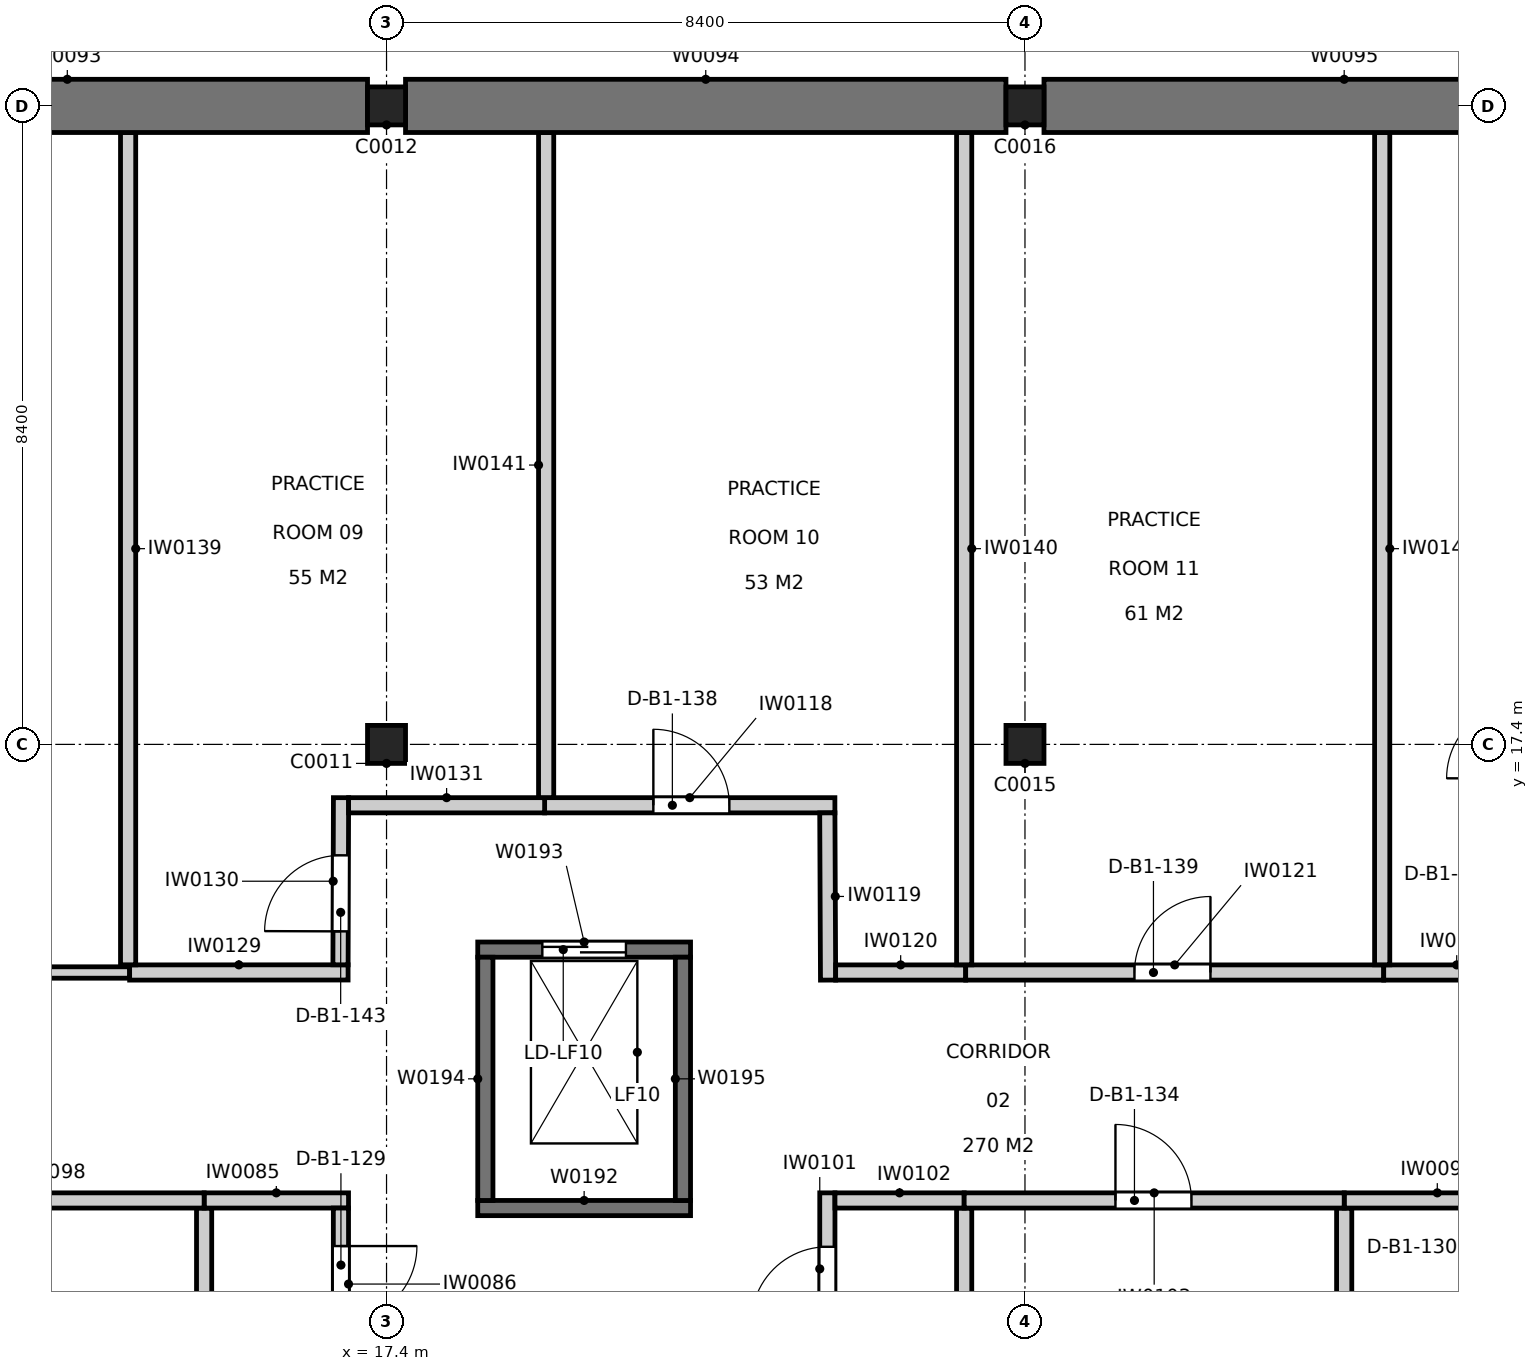
"""IFC4 building model, lengths in metres.
Left out: names, types, materials, properties, quantities, classifications, styles, units other than length and angle.
Written with IfcOpenShell. Run it as: python <this file> out.ifc"""

import sys

from ifc_helpers import new_model, si_unit, direction, frame, frame_2d, origin, origin_2d, place, context, subcontext, project, spatial, rectangle, extrude, element, fill, save


model = new_model("IFC4")
c1 = context("Model", 3, precision=1e-05, world=origin(), true_north=direction((0.0, 1.0)))
c2 = subcontext(c1, "Body", "Model", "MODEL_VIEW")
j1 = project(units=[si_unit("LENGTHUNIT", "METRE"), si_unit("PLANEANGLEUNIT", "RADIAN")], contexts=[c1])
p1 = place(None, origin())
s1 = spatial("IfcSite", under=j1, at=p1, CompositionType="ELEMENT")
p2 = place(p1, origin())
s2 = spatial("IfcBuilding", under=s1, at=p2, CompositionType="ELEMENT")
p3 = place(p2, frame((0.0, 0.0, -5.0)))
s3 = spatial("IfcBuildingStorey", under=s2, at=p3, CompositionType="ELEMENT", Elevation=-5.0)
for number, where, z_axis, x_axis in (
    (1, (17.4, 17.4, -0.5), (0.0, 0.0, 1.0), (1.0, 0.0, 0.0)),
    (2, (17.4, 25.8, -0.5), (0.0, 0.0, 1.0), (1.0, 0.0, 0.0)),
    (3, (25.8, 17.4, -0.5), (0.0, 0.0, 1.0), (1.0, 0.0, 0.0)),
    (4, (25.8, 25.8, -0.5), (0.0, 0.0, 1.0), (1.0, 0.0, 0.0)),
):
    element("IfcColumn", number, at=place(p3, frame(where, z_axis=z_axis, x_axis=x_axis)), inside=s3, PredefinedType="COLUMN", context=c2, shape_type="SweptSolid", body=[
        extrude(rectangle(XDim=0.5, YDim=0.5, at=origin_2d()), origin(), (0.0, 0.0, 1.0), 5.5),
    ])
p4 = place(p3, frame((9.25, 25.8, 0.0), z_axis=(0.0, 0.0, 1.0), x_axis=(1.0, 0.0, 0.0)))
e5 = element("IfcWall", 5, at=p4, inside=s3, PredefinedType="SOLIDWALL", context=c2, shape_type="SweptSolid", body=[
    extrude(rectangle(XDim=7.9, YDim=0.7, at=frame_2d((3.95, 0.0))), origin(), (0.0, 0.0, 1.0), 5.0),
])
p5 = place(p3, frame((17.65, 25.8, 0.0), z_axis=(0.0, 0.0, 1.0), x_axis=(1.0, 0.0, 0.0)))
e6 = element("IfcWall", 6, at=p5, inside=s3, PredefinedType="SOLIDWALL", context=c2, shape_type="SweptSolid", body=[
    extrude(rectangle(XDim=7.9, YDim=0.7, at=frame_2d((3.95, 0.0))), origin(), (0.0, 0.0, 1.0), 5.0),
])
p6 = place(p3, frame((26.05, 25.8, 0.0), z_axis=(0.0, 0.0, 1.0), x_axis=(1.0, 0.0, 0.0)))
e7 = element("IfcWall", 7, at=p6, inside=s3, PredefinedType="SOLIDWALL", context=c2, shape_type="SweptSolid", body=[
    extrude(rectangle(XDim=7.9, YDim=0.7, at=frame_2d((3.95, 0.0))), origin(), (0.0, 0.0, 1.0), 5.0),
])
p7 = place(p3, frame((18.6, 11.3, -1.4), z_axis=(0.0, 0.0, 1.0), x_axis=(1.0, 0.0, 0.0)))
e8 = element("IfcWall", 8, at=p7, inside=s3, PredefinedType="SOLIDWALL", context=c2, shape_type="SweptSolid", body=[
    extrude(rectangle(XDim=2.8, YDim=0.2, at=frame_2d((1.4, 0.0))), origin(), (0.0, 0.0, 1.0), 6.4),
])
p8 = place(p3, frame((18.6, 14.7, -1.4), z_axis=(0.0, 0.0, 1.0), x_axis=(1.0, 0.0, 0.0)))
e9 = element("IfcWall", 9, at=p8, inside=s3, PredefinedType="SOLIDWALL", context=c2, shape_type="SweptSolid", body=[
    extrude(rectangle(XDim=2.8, YDim=0.2, at=frame_2d((1.4, 0.0))), origin(), (0.0, 0.0, 1.0), 6.4),
])
p9 = place(p8, frame((0.85, 0.0, 1.4)))
e10 = element("IfcOpeningElement", 10, at=p9, cuts=e9, PredefinedType="OPENING", context=c2, shape_type="SweptSolid", body=[
    extrude(rectangle(XDim=1.1, YDim=2.1, at=frame_2d((0.55, 1.05))), frame((0.0, 0.11, 0.0), z_axis=(0.0, -1.0, 0.0), x_axis=(1.0, 0.0, 0.0)), (0.0, 0.0, 1.0), 0.22),
])
for number, where, z_axis, x_axis in (
    (11, (18.7, 11.4, -1.4), (0.0, 0.0, 1.0), (0.0, 1.0, 0.0)),
    (12, (21.3, 11.4, -1.4), (0.0, 0.0, 1.0), (0.0, 1.0, 0.0)),
):
    element("IfcWall", number, at=place(p3, frame(where, z_axis=z_axis, x_axis=x_axis)), inside=s3, PredefinedType="SOLIDWALL", context=c2, shape_type="SweptSolid", body=[
        extrude(rectangle(XDim=3.2, YDim=0.2, at=frame_2d((1.6, 0.0))), origin(), (0.0, 0.0, 1.0), 6.4),
    ])
p10 = place(p3, frame((15.0, 0.95, 0.0), z_axis=(0.0, 0.0, 1.0), x_axis=(0.0, 1.0, 0.0)))
e13 = element("IfcWall", 13, at=p10, inside=s3, PredefinedType="PARTITIONING", context=c2, shape_type="SweptSolid", body=[
    extrude(rectangle(XDim=10.35, YDim=0.2, at=frame_2d((5.175, 0.0))), origin(), (0.0, 0.0, 1.0), 4.04),
])
p11 = place(p3, frame((15.0, 11.4, 0.0), z_axis=(0.0, 0.0, 1.0), x_axis=(1.0, 0.0, 0.0)))
e14 = element("IfcWall", 14, at=p11, inside=s3, PredefinedType="PARTITIONING", context=c2, shape_type="SweptSolid", body=[
    extrude(rectangle(XDim=1.9, YDim=0.2, at=frame_2d((0.95, 0.0))), origin(), (0.0, 0.0, 1.0), 4.84),
])
p12 = place(p3, frame((16.8, 11.3, 0.0), z_axis=(0.0, 0.0, 1.0), x_axis=(0.0, -1.0, 0.0)))
e15 = element("IfcWall", 15, at=p12, inside=s3, PredefinedType="PARTITIONING", context=c2, shape_type="SweptSolid", body=[
    extrude(rectangle(XDim=2.0, YDim=0.2, at=frame_2d((1.0, 0.0))), origin(), (0.0, 0.0, 1.0), 4.84),
])
p13 = place(p12, frame((0.5, 0.0, 0.0)))
e16 = element("IfcOpeningElement", 16, at=p13, cuts=e15, PredefinedType="OPENING", context=c2, shape_type="SweptSolid", body=[
    extrude(rectangle(XDim=1.0, YDim=2.1, at=frame_2d((0.5, 1.05))), frame((0.0, 0.11, 0.0), z_axis=(0.0, -1.0, 0.0), x_axis=(1.0, 0.0, 0.0)), (0.0, 0.0, 1.0), 0.22),
])
p14 = place(p3, frame((30.0, 0.95, 0.0), z_axis=(0.0, 0.0, 1.0), x_axis=(0.0, 1.0, 0.0)))
e17 = element("IfcWall", 17, at=p14, inside=s3, PredefinedType="PARTITIONING", context=c2, shape_type="SweptSolid", body=[
    extrude(rectangle(XDim=10.35, YDim=0.2, at=frame_2d((5.175, 0.0))), origin(), (0.0, 0.0, 1.0), 4.04),
])
p15 = place(p3, frame((30.0, 11.4, 0.0), z_axis=(0.0, 0.0, 1.0), x_axis=(1.0, 0.0, 0.0)))
e18 = element("IfcWall", 18, at=p15, inside=s3, PredefinedType="PARTITIONING", context=c2, shape_type="SweptSolid", body=[
    extrude(rectangle(XDim=2.45, YDim=0.2, at=frame_2d((1.225, 0.0))), origin(), (0.0, 0.0, 1.0), 4.84),
])
p16 = place(p3, frame((10.029, 11.4, 0.0), z_axis=(0.0, 0.0, 1.0), x_axis=(1.0, 0.0, 0.0)))
e19 = element("IfcWall", 19, at=p16, inside=s3, PredefinedType="PARTITIONING", context=c2, shape_type="SweptSolid", body=[
    extrude(rectangle(XDim=4.971, YDim=0.2, at=frame_2d((2.485, 0.0))), origin(), (0.0, 0.0, 1.0), 4.84),
])
p17 = place(p16, frame((0.331, 0.0, 0.0)))
e20 = element("IfcOpeningElement", 20, at=p17, cuts=e19, PredefinedType="OPENING", context=c2, shape_type="SweptSolid", body=[
    extrude(rectangle(XDim=1.0, YDim=2.1, at=frame_2d((0.5, 1.05))), frame((0.0, 0.11, 0.0), z_axis=(0.0, -1.0, 0.0), x_axis=(1.0, 0.0, 0.0)), (0.0, 0.0, 1.0), 0.22),
])
p18 = place(p3, frame((25.0, 11.3, 0.0), z_axis=(0.0, 0.0, 1.0), x_axis=(0.0, -1.0, 0.0)))
e21 = element("IfcWall", 21, at=p18, inside=s3, PredefinedType="PARTITIONING", context=c2, shape_type="SweptSolid", body=[
    extrude(rectangle(XDim=10.35, YDim=0.2, at=frame_2d((5.175, 0.0))), origin(), (0.0, 0.0, 1.0), 4.04),
])
p19 = place(p3, frame((23.2, 9.5, 0.0), z_axis=(0.0, 0.0, 1.0), x_axis=(0.0, 1.0, 0.0)))
e22 = element("IfcWall", 22, at=p19, inside=s3, PredefinedType="PARTITIONING", context=c2, shape_type="SweptSolid", body=[
    extrude(rectangle(XDim=2.0, YDim=0.2, at=frame_2d((1.0, 0.0))), origin(), (0.0, 0.0, 1.0), 4.84),
])
p20 = place(p19, frame((0.29, 0.0, 0.0)))
e23 = element("IfcOpeningElement", 23, at=p20, cuts=e22, PredefinedType="OPENING", context=c2, shape_type="SweptSolid", body=[
    extrude(rectangle(XDim=1.0, YDim=2.1, at=frame_2d((0.5, 1.05))), frame((0.0, 0.11, 0.0), z_axis=(0.0, -1.0, 0.0), x_axis=(1.0, 0.0, 0.0)), (0.0, 0.0, 1.0), 0.22),
])
p21 = place(p3, frame((23.3, 11.4, 0.0), z_axis=(0.0, 0.0, 1.0), x_axis=(1.0, 0.0, 0.0)))
e24 = element("IfcWall", 24, at=p21, inside=s3, PredefinedType="PARTITIONING", context=c2, shape_type="SweptSolid", body=[
    extrude(rectangle(XDim=1.7, YDim=0.2, at=frame_2d((0.85, 0.0))), origin(), (0.0, 0.0, 1.0), 4.84),
])
p22 = place(p3, frame((25.0, 11.4, 0.0), z_axis=(0.0, 0.0, 1.0), x_axis=(1.0, 0.0, 0.0)))
e25 = element("IfcWall", 25, at=p22, inside=s3, PredefinedType="PARTITIONING", context=c2, shape_type="SweptSolid", body=[
    extrude(rectangle(XDim=5.0, YDim=0.2, at=frame_2d((2.5, 0.0))), origin(), (0.0, 0.0, 1.0), 4.04),
])
p23 = place(p22, frame((1.99, 0.0, 0.0)))
e26 = element("IfcOpeningElement", 26, at=p23, cuts=e25, PredefinedType="OPENING", context=c2, shape_type="SweptSolid", body=[
    extrude(rectangle(XDim=1.0, YDim=2.1, at=frame_2d((0.5, 1.05))), frame((0.0, 0.11, 0.0), z_axis=(0.0, -1.0, 0.0), x_axis=(1.0, 0.0, 0.0)), (0.0, 0.0, 1.0), 0.22),
])
p24 = place(p3, frame((9.734, 14.399, 0.0), z_axis=(0.0, 0.0, 1.0), x_axis=(1.0, 0.0, 0.0)))
e27 = element("IfcWall", 27, at=p24, inside=s3, PredefinedType="PARTITIONING", context=c2, shape_type="SweptSolid", body=[
    extrude(rectangle(XDim=4.286, YDim=0.15, at=frame_2d((2.143, 0.0))), origin(), (0.0, 0.0, 1.0), 4.24),
])
p25 = place(p3, frame((19.48, 16.599, 0.0), z_axis=(0.0, 0.0, 1.0), x_axis=(1.0, 0.0, 0.0)))
e28 = element("IfcWall", 28, at=p25, inside=s3, PredefinedType="PARTITIONING", context=c2, shape_type="SweptSolid", body=[
    extrude(rectangle(XDim=3.819, YDim=0.2, at=frame_2d((1.91, 0.0))), origin(), (0.0, 0.0, 1.0), 4.84),
])
p26 = place(p25, frame((1.431, 0.0, 0.0)))
e29 = element("IfcOpeningElement", 29, at=p26, cuts=e28, PredefinedType="OPENING", context=c2, shape_type="SweptSolid", body=[
    extrude(rectangle(XDim=1.0, YDim=2.1, at=frame_2d((0.5, 1.05))), frame((0.0, 0.11, 0.0), z_axis=(0.0, -1.0, 0.0), x_axis=(1.0, 0.0, 0.0)), (0.0, 0.0, 1.0), 0.22),
])
p27 = place(p3, frame((23.199, 16.499, 0.0), z_axis=(0.0, 0.0, 1.0), x_axis=(0.004549947354, -0.999989648936, 0.0)))
e30 = element("IfcWall", 30, at=p27, inside=s3, PredefinedType="PARTITIONING", context=c2, shape_type="SweptSolid", body=[
    extrude(rectangle(XDim=2.2, YDim=0.2, at=frame_2d((1.1, 0.0))), origin(), (0.0, 0.0, 1.0), 4.24),
])
p28 = place(p3, frame((23.309, 14.399, 0.0), z_axis=(0.0, 0.0, 1.0), x_axis=(1.0, 0.0, 0.0)))
e31 = element("IfcWall", 31, at=p28, inside=s3, PredefinedType="PARTITIONING", context=c2, shape_type="SweptSolid", body=[
    extrude(rectangle(XDim=1.711, YDim=0.2, at=frame_2d((0.855, 0.0))), origin(), (0.0, 0.0, 1.0), 4.24),
])
p29 = place(p3, frame((25.02, 14.399, 0.0), z_axis=(0.0, 0.0, 1.0), x_axis=(1.0, 0.0, 0.0)))
e32 = element("IfcWall", 32, at=p29, inside=s3, PredefinedType="PARTITIONING", context=c2, shape_type="SweptSolid", body=[
    extrude(rectangle(XDim=5.5, YDim=0.2, at=frame_2d((2.75, 0.0))), origin(), (0.0, 0.0, 1.0), 4.04),
])
p30 = place(p29, frame((2.22, 0.0, 0.0)))
e33 = element("IfcOpeningElement", 33, at=p30, cuts=e32, PredefinedType="OPENING", context=c2, shape_type="SweptSolid", body=[
    extrude(rectangle(XDim=1.0, YDim=2.1, at=frame_2d((0.5, 1.05))), frame((0.0, 0.11, 0.0), z_axis=(0.0, -1.0, 0.0), x_axis=(1.0, 0.0, 0.0)), (0.0, 0.0, 1.0), 0.22),
])
p31 = place(p3, frame((14.02, 14.399, 0.0), z_axis=(0.0, 0.0, 1.0), x_axis=(0.999999909799, 0.000424736625, 0.0)))
e34 = element("IfcWall", 34, at=p31, inside=s3, PredefinedType="PARTITIONING", context=c2, shape_type="SweptSolid", body=[
    extrude(rectangle(XDim=2.874, YDim=0.2, at=frame_2d((1.437, 0.0))), origin(), (0.0, 0.0, 1.0), 4.24),
])
p32 = place(p3, frame((16.794, 14.5, 0.0), z_axis=(0.0, 0.0, 1.0), x_axis=(0.003108678218, 0.999995168048, 0.0)))
e35 = element("IfcWall", 35, at=p32, inside=s3, PredefinedType="PARTITIONING", context=c2, shape_type="SweptSolid", body=[
    extrude(rectangle(XDim=2.199, YDim=0.2, at=frame_2d((1.1, 0.0))), origin(), (0.0, 0.0, 1.0), 4.24),
])
p33 = place(p32, frame((0.44, 0.0, 0.0)))
e36 = element("IfcOpeningElement", 36, at=p33, cuts=e35, PredefinedType="OPENING", context=c2, shape_type="SweptSolid", body=[
    extrude(rectangle(XDim=1.0, YDim=2.1, at=frame_2d((0.5, 1.05))), frame((0.0, 0.11, 0.0), z_axis=(0.0, -1.0, 0.0), x_axis=(1.0, 0.0, 0.0)), (0.0, 0.0, 1.0), 0.22),
])
p34 = place(p3, frame((16.901, 16.599, 0.0), z_axis=(0.0, 0.0, 1.0), x_axis=(1.0, 0.0, 0.0)))
e37 = element("IfcWall", 37, at=p34, inside=s3, PredefinedType="PARTITIONING", context=c2, shape_type="SweptSolid", body=[
    extrude(rectangle(XDim=2.579, YDim=0.2, at=frame_2d((1.29, 0.0))), origin(), (0.0, 0.0, 1.0), 4.04),
])
p35 = place(p3, frame((30.52, 14.399, 0.0), z_axis=(0.0, 0.0, 1.0), x_axis=(1.0, 0.0, 0.0)))
e38 = element("IfcWall", 38, at=p35, inside=s3, PredefinedType="PARTITIONING", context=c2, shape_type="SweptSolid", body=[
    extrude(rectangle(XDim=1.921, YDim=0.2, at=frame_2d((0.96, 0.0))), origin(), (0.0, 0.0, 1.0), 4.24),
])
for number, where, z_axis, x_axis in (
    (39, (14.0, 25.45, 0.0), (0.0, 0.0, 1.0), (0.0, -1.0, 0.0)),
    (40, (25.0, 25.45, 0.0), (0.0, 0.0, 1.0), (0.0, -1.0, 0.0)),
):
    element("IfcWall", number, at=place(p3, frame(where, z_axis=z_axis, x_axis=x_axis)), inside=s3, PredefinedType="PARTITIONING", context=c2, shape_type="SweptSolid", body=[
        extrude(rectangle(XDim=10.95, YDim=0.2, at=frame_2d((5.475, 0.0))), origin(), (0.0, 0.0, 1.0), 4.04),
    ])
p36 = place(p3, frame((19.5, 16.7, 0.0), z_axis=(0.0, 0.0, 1.0), x_axis=(0.0, 1.0, 0.0)))
e41 = element("IfcWall", 41, at=p36, inside=s3, PredefinedType="PARTITIONING", context=c2, shape_type="SweptSolid", body=[
    extrude(rectangle(XDim=8.75, YDim=0.2, at=frame_2d((4.375, 0.0))), origin(), (0.0, 0.0, 1.0), 4.04),
])
p37 = place(p3, frame((30.5, 25.45, 0.0), z_axis=(0.0, 0.0, 1.0), x_axis=(0.0, -1.0, 0.0)))
e42 = element("IfcWall", 42, at=p37, inside=s3, PredefinedType="PARTITIONING", context=c2, shape_type="SweptSolid", body=[
    extrude(rectangle(XDim=10.95, YDim=0.2, at=frame_2d((5.475, 0.0))), origin(), (0.0, 0.0, 1.0), 4.04),
])
p38 = place(p13, origin())
e43 = element("IfcDoor", 43, at=p38, inside=s3, OperationType="SINGLE_SWING_LEFT", PredefinedType="DOOR", context=c2, shape_type="SweptSolid", body=[
    extrude(rectangle(XDim=1.0, YDim=2.1, at=frame_2d((0.5, 1.05))), frame((0.0, 0.025, 0.0), z_axis=(0.0, -1.0, 0.0), x_axis=(1.0, 0.0, 0.0)), (0.0, 0.0, 1.0), 0.05),
])
fill(e16, e43)
p39 = place(p20, origin())
e44 = element("IfcDoor", 44, at=p39, inside=s3, OperationType="SINGLE_SWING_LEFT", PredefinedType="DOOR", context=c2, shape_type="SweptSolid", body=[
    extrude(rectangle(XDim=1.0, YDim=2.1, at=frame_2d((0.5, 1.05))), frame((0.0, 0.025, 0.0), z_axis=(0.0, -1.0, 0.0), x_axis=(1.0, 0.0, 0.0)), (0.0, 0.0, 1.0), 0.05),
])
fill(e23, e44)
p40 = place(p23, origin())
e45 = element("IfcDoor", 45, at=p40, inside=s3, OperationType="SINGLE_SWING_LEFT", PredefinedType="DOOR", context=c2, shape_type="SweptSolid", body=[
    extrude(rectangle(XDim=1.0, YDim=2.1, at=frame_2d((0.5, 1.05))), frame((0.0, 0.025, 0.0), z_axis=(0.0, -1.0, 0.0), x_axis=(1.0, 0.0, 0.0)), (0.0, 0.0, 1.0), 0.05),
])
fill(e26, e45)
p41 = place(p26, origin())
e46 = element("IfcDoor", 46, at=p41, inside=s3, OperationType="SINGLE_SWING_LEFT", PredefinedType="DOOR", context=c2, shape_type="SweptSolid", body=[
    extrude(rectangle(XDim=1.0, YDim=2.1, at=frame_2d((0.5, 1.05))), frame((0.0, 0.025, 0.0), z_axis=(0.0, -1.0, 0.0), x_axis=(1.0, 0.0, 0.0)), (0.0, 0.0, 1.0), 0.05),
])
fill(e29, e46)
p42 = place(p30, origin())
e47 = element("IfcDoor", 47, at=p42, inside=s3, OperationType="SINGLE_SWING_RIGHT", PredefinedType="DOOR", context=c2, shape_type="SweptSolid", body=[
    extrude(rectangle(XDim=1.0, YDim=2.1, at=frame_2d((0.5, 1.05))), frame((0.0, 0.025, 0.0), z_axis=(0.0, -1.0, 0.0), x_axis=(1.0, 0.0, 0.0)), (0.0, 0.0, 1.0), 0.05),
])
fill(e33, e47)
p43 = place(p33, origin())
e48 = element("IfcDoor", 48, at=p43, inside=s3, OperationType="SINGLE_SWING_LEFT", PredefinedType="DOOR", context=c2, shape_type="SweptSolid", body=[
    extrude(rectangle(XDim=1.0, YDim=2.1, at=frame_2d((0.5, 1.05))), frame((0.0, 0.025, 0.0), z_axis=(0.0, -1.0, 0.0), x_axis=(1.0, 0.0, 0.0)), (0.0, 0.0, 1.0), 0.05),
])
fill(e36, e48)
p44 = place(p9, origin())
e49 = element("IfcDoor", 49, at=p44, inside=s3, OperationType="SLIDING_TO_LEFT", PredefinedType="DOOR", context=c2, shape_type="SweptSolid", body=[
    extrude(rectangle(XDim=1.1, YDim=2.1, at=frame_2d((0.55, 1.05))), frame((0.0, 0.025, 0.0), z_axis=(0.0, -1.0, 0.0), x_axis=(1.0, 0.0, 0.0)), (0.0, 0.0, 1.0), 0.05),
])
fill(e10, e49)
save(model, sys.argv[1])
